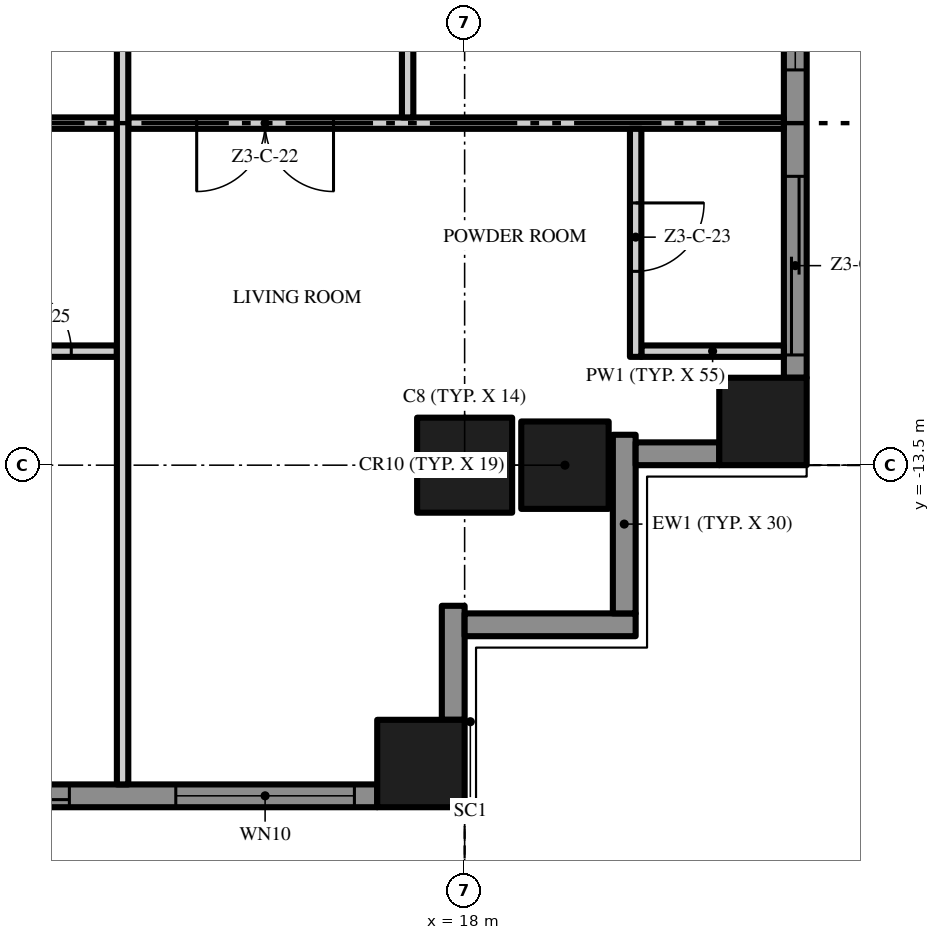
"""IFC4 building model, lengths in metres.
Left out: names, types, materials, properties, quantities, classifications, styles, units other than length and angle.
Written with IfcOpenShell. Run it as: python <this file> out.ifc"""

import sys

from ifc_helpers import new_model, si_unit, direction, frame, frame_2d, origin, origin_2d, place, context, subcontext, project, spatial, polyline, rectangle, outline, extrude, element, fill, save


model = new_model("IFC4")
c1 = context("Model", 3, precision=1e-05, world=origin(), true_north=direction((0.0, 1.0)))
c2 = subcontext(c1, "Body", "Model", "MODEL_VIEW")
j1 = project(units=[si_unit("LENGTHUNIT", "METRE"), si_unit("PLANEANGLEUNIT", "RADIAN")], contexts=[c1])
p1 = place(None, origin())
s1 = spatial("IfcSite", under=j1, at=p1, CompositionType="ELEMENT")
p2 = place(p1, origin())
s2 = spatial("IfcBuilding", under=s1, at=p2, CompositionType="ELEMENT")
p3 = place(p2, frame((0.0, 0.0, 151.6)))
s3 = spatial("IfcBuildingStorey", under=s2, at=p3, CompositionType="ELEMENT", Elevation=151.6)
p4 = place(p3, frame((18.0, -13.5, 0.0), z_axis=(0.0, 0.0, 1.0), x_axis=(1.0, 0.0, 0.0)))
e1 = element("IfcColumn", 1, at=p4, inside=s3, PredefinedType="COLUMN", context=c2, shape_type="SweptSolid", body=[
    extrude(rectangle(XDim=1.25, YDim=1.25, at=origin_2d()), origin(), (0.0, 0.0, 1.0), 3.5),
])
for number, where, z_axis, x_axis in (
    (2, (17.425, -17.425, 0.0), (0.0, 0.0, 1.0), (1.0, 0.0, 0.0)),
    (3, (21.925, -12.925, 0.0), (0.0, 0.0, 1.0), (1.0, 0.0, 0.0)),
    (4, (19.32, -13.5, 0.0), (0.0, 0.0, 1.0), (1.0, 0.0, 0.0)),
):
    element("IfcColumn", number, at=place(p3, frame(where, z_axis=z_axis, x_axis=x_axis)), inside=s3, PredefinedType="COLUMN", context=c2, shape_type="SweptSolid", body=[
        extrude(rectangle(XDim=1.15, YDim=1.15, at=origin_2d()), origin(), (0.0, 0.0, 1.0), 3.5),
    ])
p5 = place(p3, frame((16.85, -17.85, 0.0), z_axis=(0.0, 0.0, 1.0), x_axis=(-1.0, 0.0, 0.0)))
e5 = element("IfcWall", 5, at=p5, inside=s3, PredefinedType="SOLIDWALL", context=c2, shape_type="SweptSolid", body=[
    extrude(rectangle(XDim=7.275, YDim=0.3, at=frame_2d((3.638, 0.0))), origin(), (0.0, 0.0, 1.0), 3.5),
])
p6 = place(p5, frame((4.05, 0.0, 0.0)))
e6 = element("IfcOpeningElement", 6, at=p6, cuts=e5, PredefinedType="OPENING", context=c2, shape_type="SweptSolid", body=[
    extrude(rectangle(XDim=2.9, YDim=2.4, at=frame_2d((1.45, 1.2))), frame((0.0, 0.16, 0.0), z_axis=(0.0, -1.0, 0.0), x_axis=(1.0, 0.0, 0.0)), (0.0, 0.0, 1.0), 0.32),
])
p7 = place(p5, frame((0.3, 0.0, 0.45)))
e7 = element("IfcOpeningElement", 7, at=p7, cuts=e5, PredefinedType="OPENING", context=c2, shape_type="SweptSolid", body=[
    extrude(rectangle(XDim=2.35, YDim=2.65, at=frame_2d((1.175, 1.325))), frame((0.0, 0.16, 0.0), z_axis=(0.0, -1.0, 0.0), x_axis=(1.0, 0.0, 0.0)), (0.0, 0.0, 1.0), 0.32),
])
p8 = place(p3, frame((17.85, -15.35, 0.0), z_axis=(0.0, 0.0, 1.0), x_axis=(0.0, -1.0, 0.0)))
e8 = element("IfcWall", 8, at=p8, inside=s3, PredefinedType="SOLIDWALL", context=c2, shape_type="SweptSolid", body=[
    extrude(rectangle(XDim=1.5, YDim=0.3, at=frame_2d((0.75, 0.0))), origin(), (0.0, 0.0, 1.0), 3.5),
])
p9 = place(p3, frame((20.25, -15.6, 0.0), z_axis=(0.0, 0.0, 1.0), x_axis=(-1.0, 0.0, 0.0)))
e9 = element("IfcWall", 9, at=p9, inside=s3, PredefinedType="SOLIDWALL", context=c2, shape_type="SweptSolid", body=[
    extrude(rectangle(XDim=2.25, YDim=0.3, at=frame_2d((1.125, 0.0))), origin(), (0.0, 0.0, 1.0), 3.5),
])
p10 = place(p3, frame((20.1, -13.1, 0.0), z_axis=(0.0, 0.0, 1.0), x_axis=(0.0, -1.0, 0.0)))
e10 = element("IfcWall", 10, at=p10, inside=s3, PredefinedType="SOLIDWALL", context=c2, shape_type="SweptSolid", body=[
    extrude(rectangle(XDim=2.35, YDim=0.3, at=frame_2d((1.175, 0.0))), origin(), (0.0, 0.0, 1.0), 3.5),
])
p11 = place(p3, frame((21.35, -13.35, 0.0), z_axis=(0.0, 0.0, 1.0), x_axis=(-1.0, 0.0, 0.0)))
e11 = element("IfcWall", 11, at=p11, inside=s3, PredefinedType="SOLIDWALL", context=c2, shape_type="SweptSolid", body=[
    extrude(rectangle(XDim=1.1, YDim=0.3, at=frame_2d((0.55, 0.0))), origin(), (0.0, 0.0, 1.0), 3.5),
])
p12 = place(p3, frame((22.35, -5.075, 0.0), z_axis=(0.0, 0.0, 1.0), x_axis=(0.0, -1.0, 0.0)))
e12 = element("IfcWall", 12, at=p12, inside=s3, PredefinedType="SOLIDWALL", context=c2, shape_type="SweptSolid", body=[
    extrude(rectangle(XDim=7.275, YDim=0.3, at=frame_2d((3.638, 0.0))), origin(), (0.0, 0.0, 1.0), 3.5),
])
p13 = place(p12, frame((4.625, 0.0, 0.0)))
e13 = element("IfcOpeningElement", 13, at=p13, cuts=e12, PredefinedType="OPENING", context=c2, shape_type="SweptSolid", body=[
    extrude(rectangle(XDim=2.35, YDim=2.4, at=frame_2d((1.175, 1.2))), frame((0.0, 0.16, 0.0), z_axis=(0.0, -1.0, 0.0), x_axis=(1.0, 0.0, 0.0)), (0.0, 0.0, 1.0), 0.32),
])
p14 = place(p12, frame((0.325, 0.0, 0.45)))
e14 = element("IfcOpeningElement", 14, at=p14, cuts=e12, PredefinedType="OPENING", context=c2, shape_type="SweptSolid", body=[
    extrude(rectangle(XDim=2.9, YDim=2.65, at=frame_2d((1.45, 1.325))), frame((0.0, 0.16, 0.0), z_axis=(0.0, -1.0, 0.0), x_axis=(1.0, 0.0, 0.0)), (0.0, 0.0, 1.0), 0.32),
])
p15 = place(p3, origin())
e15 = element("IfcWall", 15, at=p15, inside=s3, PredefinedType="USERDEFINED", context=c2, shape_type="SweptSolid", body=[
    extrude(outline(polyline([(-18.0, -21.0), (-16.5, -20.771), (-15.0, -20.171), (-13.5, -19.429), (-12.0, -18.829), (-10.5, -18.6), (-9.0, -18.829), (-7.5, -19.429), (-6.0, -20.171), (-4.5, -20.771), (-3.0, -21.0), (-1.5, -20.771), (0.0, -20.171), (1.5, -19.429), (3.0, -18.829), (4.5, -18.6), (6.0, -18.829), (7.5, -19.429), (9.0, -20.171), (10.5, -20.771), (12.0, -21.0), (13.5, -20.771), (15.0, -20.171), (16.5, -19.429), (18.0, -18.829), (17.907, -18.597), (16.398, -19.201), (14.898, -19.942), (13.434, -20.528), (12.0, -20.747), (10.566, -20.528), (9.102, -19.942), (7.602, -19.201), (6.066, -18.586), (4.5, -18.347), (2.934, -18.586), (1.398, -19.201), (-0.102, -19.942), (-1.566, -20.528), (-3.0, -20.747), (-4.434, -20.528), (-5.898, -19.942), (-7.398, -19.201), (-8.934, -18.586), (-10.5, -18.347), (-12.066, -18.586), (-13.602, -19.201), (-15.102, -19.942), (-16.566, -20.528), (-18.038, -20.753), (-18.0, -21.0)])), origin(), (0.0, 0.0, 1.0), 0.9),
])
p16 = place(p3, origin())
e16 = element("IfcWall", 16, at=p16, inside=s3, PredefinedType="USERDEFINED", context=c2, shape_type="SweptSolid", body=[
    extrude(outline(polyline([(25.5, -13.5), (25.271, -12.0), (24.671, -10.5), (23.929, -9.0), (23.329, -7.5), (23.1, -6.0), (23.329, -4.5), (23.929, -3.0), (24.671, -1.5), (25.271, 0.0), (25.5, 1.5), (25.271, 3.0), (24.671, 4.5), (23.929, 6.0), (23.329, 7.5), (23.1, 9.0), (23.329, 10.5), (23.929, 12.0), (24.671, 13.5), (25.271, 15.0), (25.5, 16.5), (25.271, 18.0), (25.024, 17.962), (25.247, 16.5), (25.028, 15.066), (24.442, 13.602), (23.701, 12.102), (23.086, 10.566), (22.847, 9.0), (23.086, 7.434), (23.701, 5.898), (24.442, 4.398), (25.028, 2.934), (25.247, 1.5), (25.028, 0.066), (24.442, -1.398), (23.701, -2.898), (23.086, -4.434), (22.847, -6.0), (23.086, -7.566), (23.701, -9.102), (24.442, -10.602), (25.028, -12.066), (25.253, -13.538), (25.5, -13.5)])), origin(), (0.0, 0.0, 1.0), 0.9),
])
p17 = place(p3, frame((11.325, -12.0, 0.0), z_axis=(0.0, 0.0, 1.0), x_axis=(1.0, 0.0, 0.0)))
e17 = element("IfcWall", 17, at=p17, inside=s3, PredefinedType="PARTITIONING", context=c2, shape_type="SweptSolid", body=[
    extrude(rectangle(XDim=2.1, YDim=0.15, at=frame_2d((1.05, 0.0))), origin(), (0.0, 0.0, 1.0), 3.5),
])
p18 = place(p17, frame((0.6, 0.0, 0.0)))
e18 = element("IfcOpeningElement", 18, at=p18, cuts=e17, PredefinedType="OPENING", context=c2, shape_type="SweptSolid", body=[
    extrude(rectangle(XDim=0.9, YDim=2.1, at=frame_2d((0.45, 1.05))), frame((0.0, 0.085, 0.0), z_axis=(0.0, -1.0, 0.0), x_axis=(1.0, 0.0, 0.0)), (0.0, 0.0, 1.0), 0.17),
])
p19 = place(p3, frame((20.325, -12.0, 0.0), z_axis=(0.0, 0.0, 1.0), x_axis=(1.0, 0.0, 0.0)))
e19 = element("IfcWall", 19, at=p19, inside=s3, PredefinedType="PARTITIONING", context=c2, shape_type="SweptSolid", body=[
    extrude(rectangle(XDim=1.875, YDim=0.15, at=frame_2d((0.938, 0.0))), origin(), (0.0, 0.0, 1.0), 3.5),
])
p20 = place(p3, frame((11.325, -9.0, 0.0), z_axis=(0.0, 0.0, 1.0), x_axis=(1.0, 0.0, 0.0)))
e20 = element("IfcWall", 20, at=p20, inside=s3, PredefinedType="PARTITIONING", context=c2, shape_type="SweptSolid", body=[
    extrude(rectangle(XDim=2.1, YDim=0.15, at=frame_2d((1.05, 0.0))), origin(), (0.0, 0.0, 1.0), 3.5),
])
p21 = place(p3, frame((22.2, -9.0, 0.0), z_axis=(0.0, 0.0, 1.0), x_axis=(-1.0, 0.0, 0.0)))
e21 = element("IfcWall", 21, at=p21, inside=s3, PredefinedType="PARTITIONING", context=c2, shape_type="SweptSolid", body=[
    extrude(rectangle(XDim=8.625, YDim=0.15, at=frame_2d((4.312, 0.0))), origin(), (0.0, 0.0, 1.0), 3.5),
])
p22 = place(p21, frame((5.925, 0.0, 0.0)))
e22 = element("IfcOpeningElement", 22, at=p22, cuts=e21, PredefinedType="OPENING", context=c2, shape_type="SweptSolid", body=[
    extrude(rectangle(XDim=1.8, YDim=2.4, at=frame_2d((0.9, 1.2))), frame((0.0, 0.085, 0.0), z_axis=(0.0, -1.0, 0.0), x_axis=(1.0, 0.0, 0.0)), (0.0, 0.0, 1.0), 0.17),
])
p23 = place(p3, frame((13.5, -17.7, 0.0), z_axis=(0.0, 0.0, 1.0), x_axis=(0.0, 1.0, 0.0)))
e23 = element("IfcWall", 23, at=p23, inside=s3, PredefinedType="PARTITIONING", context=c2, shape_type="SweptSolid", body=[
    extrude(rectangle(XDim=13.275, YDim=0.15, at=frame_2d((6.638, 0.0))), origin(), (0.0, 0.0, 1.0), 3.5),
])
p24 = place(p23, frame((10.5, 0.0, 0.0)))
e24 = element("IfcOpeningElement", 24, at=p24, cuts=e23, PredefinedType="OPENING", context=c2, shape_type="SweptSolid", body=[
    extrude(rectangle(XDim=0.9, YDim=2.1, at=frame_2d((0.45, 1.05))), frame((0.0, 0.085, 0.0), z_axis=(0.0, -1.0, 0.0), x_axis=(1.0, 0.0, 0.0)), (0.0, 0.0, 1.0), 0.17),
])
p25 = place(p3, frame((17.25, -8.925, 0.0), z_axis=(0.0, 0.0, 1.0), x_axis=(0.0, 1.0, 0.0)))
e25 = element("IfcWall", 25, at=p25, inside=s3, PredefinedType="PARTITIONING", context=c2, shape_type="SweptSolid", body=[
    extrude(rectangle(XDim=4.5, YDim=0.15, at=frame_2d((2.25, 0.0))), origin(), (0.0, 0.0, 1.0), 3.5),
])
p26 = place(p3, frame((20.25, -9.075, 0.0), z_axis=(0.0, 0.0, 1.0), x_axis=(0.0, -1.0, 0.0)))
e26 = element("IfcWall", 26, at=p26, inside=s3, PredefinedType="PARTITIONING", context=c2, shape_type="SweptSolid", body=[
    extrude(rectangle(XDim=3.0, YDim=0.15, at=frame_2d((1.5, 0.0))), origin(), (0.0, 0.0, 1.0), 3.5),
])
p27 = place(p26, frame((0.975, 0.0, 0.0)))
e27 = element("IfcOpeningElement", 27, at=p27, cuts=e26, PredefinedType="OPENING", context=c2, shape_type="SweptSolid", body=[
    extrude(rectangle(XDim=0.9, YDim=2.1, at=frame_2d((0.45, 1.05))), frame((0.0, 0.085, 0.0), z_axis=(0.0, -1.0, 0.0), x_axis=(1.0, 0.0, 0.0)), (0.0, 0.0, 1.0), 0.17),
])
p28 = place(p6, origin())
e28 = element("IfcDoor", 28, at=p28, inside=s3, OperationType="SINGLE_SWING_LEFT", PredefinedType="DOOR", context=c2, shape_type="SweptSolid", body=[
    extrude(rectangle(XDim=2.9, YDim=2.4, at=frame_2d((1.45, 1.2))), frame((0.0, 0.025, 0.0), z_axis=(0.0, -1.0, 0.0), x_axis=(1.0, 0.0, 0.0)), (0.0, 0.0, 1.0), 0.05),
])
fill(e6, e28)
p29 = place(p7, origin())
e29 = element("IfcWindow", 29, at=p29, inside=s3, PartitioningType="SINGLE_PANEL", PredefinedType="WINDOW", context=c2, shape_type="SweptSolid", body=[
    extrude(rectangle(XDim=2.35, YDim=2.65, at=frame_2d((1.175, 1.325))), frame((0.0, 0.03, 0.0), z_axis=(0.0, -1.0, 0.0), x_axis=(1.0, 0.0, 0.0)), (0.0, 0.0, 1.0), 0.06),
])
fill(e7, e29)
p30 = place(p13, origin())
e30 = element("IfcDoor", 30, at=p30, inside=s3, OperationType="SINGLE_SWING_LEFT", PredefinedType="DOOR", context=c2, shape_type="SweptSolid", body=[
    extrude(rectangle(XDim=2.35, YDim=2.4, at=frame_2d((1.175, 1.2))), frame((0.0, 0.025, 0.0), z_axis=(0.0, -1.0, 0.0), x_axis=(1.0, 0.0, 0.0)), (0.0, 0.0, 1.0), 0.05),
])
fill(e13, e30)
p31 = place(p14, origin())
e31 = element("IfcWindow", 31, at=p31, inside=s3, PartitioningType="SINGLE_PANEL", PredefinedType="WINDOW", context=c2, shape_type="SweptSolid", body=[
    extrude(rectangle(XDim=2.9, YDim=2.65, at=frame_2d((1.45, 1.325))), frame((0.0, 0.03, 0.0), z_axis=(0.0, -1.0, 0.0), x_axis=(1.0, 0.0, 0.0)), (0.0, 0.0, 1.0), 0.06),
])
fill(e14, e31)
p32 = place(p22, origin())
e32 = element("IfcDoor", 32, at=p32, inside=s3, OperationType="DOUBLE_DOOR_SINGLE_SWING", PredefinedType="DOOR", context=c2, shape_type="SweptSolid", body=[
    extrude(rectangle(XDim=1.8, YDim=2.4, at=frame_2d((0.9, 1.2))), frame((0.0, 0.025, 0.0), z_axis=(0.0, -1.0, 0.0), x_axis=(1.0, 0.0, 0.0)), (0.0, 0.0, 1.0), 0.05),
])
fill(e22, e32)
p33 = place(p27, origin())
e33 = element("IfcDoor", 33, at=p33, inside=s3, OperationType="SINGLE_SWING_LEFT", PredefinedType="DOOR", context=c2, shape_type="SweptSolid", body=[
    extrude(rectangle(XDim=0.9, YDim=2.1, at=frame_2d((0.45, 1.05))), frame((0.0, 0.025, 0.0), z_axis=(0.0, -1.0, 0.0), x_axis=(1.0, 0.0, 0.0)), (0.0, 0.0, 1.0), 0.05),
])
fill(e27, e33)
p34 = place(p18, origin())
e34 = element("IfcDoor", 34, at=p34, inside=s3, OperationType="SINGLE_SWING_LEFT", PredefinedType="DOOR", context=c2, shape_type="SweptSolid", body=[
    extrude(rectangle(XDim=0.9, YDim=2.1, at=frame_2d((0.45, 1.05))), frame((0.0, 0.025, 0.0), z_axis=(0.0, -1.0, 0.0), x_axis=(1.0, 0.0, 0.0)), (0.0, 0.0, 1.0), 0.05),
])
fill(e18, e34)
save(model, sys.argv[1])
